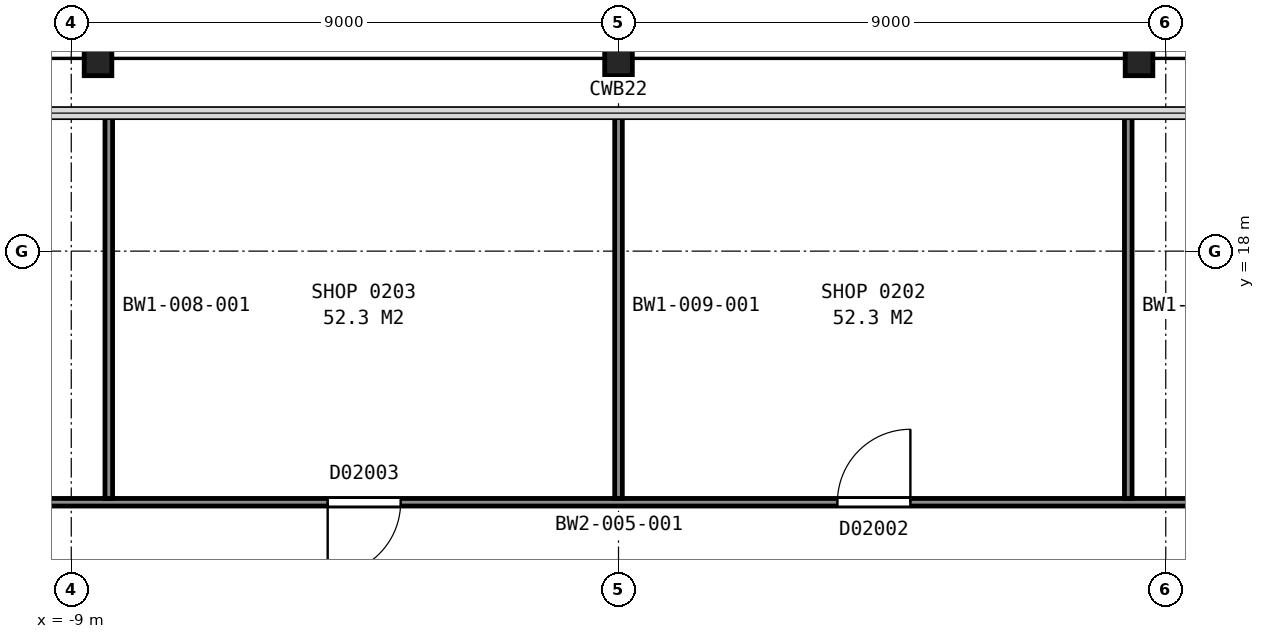
"""IFC4 building model, lengths in metres.
Left out: names, types, materials, properties, quantities, classifications, styles, units other than length and angle.
Written with IfcOpenShell. Run it as: python <this file> out.ifc"""

import sys

from ifc_helpers import new_model, si_unit, direction, frame, frame_2d, origin, origin_2d, place, context, subcontext, project, spatial, rectangle, i_section, extrude, element, fill, save


model = new_model("IFC4")
c1 = context("Model", 3, precision=1e-05, world=origin(), true_north=direction((0.0, 1.0)))
c2 = subcontext(c1, "Body", "Model", "MODEL_VIEW")
j1 = project(units=[si_unit("LENGTHUNIT", "METRE"), si_unit("PLANEANGLEUNIT", "RADIAN")], contexts=[c1])
p1 = place(None, origin())
s1 = spatial("IfcSite", under=j1, at=p1, CompositionType="ELEMENT")
p2 = place(p1, origin())
s2 = spatial("IfcBuilding", under=s1, at=p2, CompositionType="ELEMENT")
p3 = place(p2, frame((0.0, 0.0, 17.4)))
s3 = spatial("IfcBuildingStorey", under=s2, at=p3, CompositionType="ELEMENT", Elevation=17.4)
for number, where, z_axis, x_axis in (
    (1, (8.56, 21.17, -0.16), (0.0, 0.0, 1.0), (1.0, 0.0, 0.0)),
    (2, (0.0, 21.17, -0.16), (0.0, 0.0, 1.0), (1.0, 0.0, 0.0)),
    (3, (-8.56, 21.17, -0.16), (0.0, 0.0, 1.0), (1.0, 0.0, 0.0)),
):
    element("IfcColumn", number, at=place(p3, frame(where, z_axis=z_axis, x_axis=x_axis)), inside=s3, PredefinedType="COLUMN", context=c2, shape_type="SweptSolid", body=[
        extrude(i_section(OverallWidth=0.455, OverallDepth=0.569, WebThickness=0.078, FlangeThickness=0.125, FilletRadius=0.015, at=origin_2d()), origin(), (0.0, 0.0, 1.0), 5.16),
    ])
p4 = place(p3, frame((-15.148, 13.87, 0.0), z_axis=(0.0, 0.0, 1.0), x_axis=(1.0, 0.0, 0.0)))
e4 = element("IfcWall", 4, at=p4, inside=s3, PredefinedType="PARTITIONING", context=c2, shape_type="SweptSolid", body=[
    extrude(rectangle(XDim=30.297, YDim=0.125, at=frame_2d((15.148, 0.0))), origin(), (0.0, 0.0, 1.0), 3.853),
])
p5 = place(p4, frame((26.281, 0.0, 0.0)))
e5 = element("IfcOpeningElement", 5, at=p5, cuts=e4, PredefinedType="OPENING", context=c2, shape_type="SweptSolid", body=[
    extrude(rectangle(XDim=1.2, YDim=2.1, at=frame_2d((0.6, 1.05))), frame((0.0, 0.073, 0.0), z_axis=(0.0, -1.0, 0.0), x_axis=(1.0, 0.0, 0.0)), (0.0, 0.0, 1.0), 0.145),
])
p6 = place(p4, frame((18.749, 0.0, 0.0)))
e6 = element("IfcOpeningElement", 6, at=p6, cuts=e4, PredefinedType="OPENING", context=c2, shape_type="SweptSolid", body=[
    extrude(rectangle(XDim=1.2, YDim=2.1, at=frame_2d((0.6, 1.05))), frame((0.0, 0.073, 0.0), z_axis=(0.0, -1.0, 0.0), x_axis=(1.0, 0.0, 0.0)), (0.0, 0.0, 1.0), 0.145),
])
p7 = place(p4, frame((10.365, 0.0, 0.0)))
e7 = element("IfcOpeningElement", 7, at=p7, cuts=e4, PredefinedType="OPENING", context=c2, shape_type="SweptSolid", body=[
    extrude(rectangle(XDim=1.2, YDim=2.1, at=frame_2d((0.6, 1.05))), frame((0.0, 0.073, 0.0), z_axis=(0.0, -1.0, 0.0), x_axis=(1.0, 0.0, 0.0)), (0.0, 0.0, 1.0), 0.145),
])
p8 = place(p4, frame((2.812, 0.0, 0.0)))
e8 = element("IfcOpeningElement", 8, at=p8, cuts=e4, PredefinedType="OPENING", context=c2, shape_type="SweptSolid", body=[
    extrude(rectangle(XDim=1.2, YDim=2.1, at=frame_2d((0.6, 1.05))), frame((0.0, 0.073, 0.0), z_axis=(0.0, -1.0, 0.0), x_axis=(1.0, 0.0, 0.0)), (0.0, 0.0, 1.0), 0.145),
])
for number, where, z_axis, x_axis in (
    (9, (-8.383, 13.933, 0.0), (0.0, 0.0, 1.0), (0.0, 1.0, 0.0)),
    (10, (0.0, 13.933, 0.0), (0.0, 0.0, 1.0), (0.0, 1.0, 0.0)),
    (11, (8.383, 13.933, 0.0), (0.0, 0.0, 1.0), (0.0, 1.0, 0.0)),
):
    element("IfcWall", number, at=place(p3, frame(where, z_axis=z_axis, x_axis=x_axis)), inside=s3, PredefinedType="PARTITIONING", context=c2, shape_type="SweptSolid", body=[
        extrude(rectangle(XDim=6.337, YDim=0.125, at=frame_2d((3.169, 0.0))), origin(), (0.0, 0.0, 1.0), 3.853),
    ])
p9 = place(p6, origin())
e12 = element("IfcDoor", 12, at=p9, inside=s3, OperationType="SINGLE_SWING_RIGHT", PredefinedType="DOOR", context=c2, shape_type="SweptSolid", body=[
    extrude(rectangle(XDim=1.2, YDim=2.1, at=frame_2d((0.6, 1.05))), frame((0.0, 0.025, 0.0), z_axis=(0.0, -1.0, 0.0), x_axis=(1.0, 0.0, 0.0)), (0.0, 0.0, 1.0), 0.05),
])
fill(e6, e12)
p10 = place(p7, origin())
e13 = element("IfcDoor", 13, at=p10, inside=s3, OperationType="SINGLE_SWING_LEFT", PredefinedType="DOOR", context=c2, shape_type="SweptSolid", body=[
    extrude(rectangle(XDim=1.2, YDim=2.1, at=frame_2d((0.6, 1.05))), frame((0.0, 0.025, 0.0), z_axis=(0.0, -1.0, 0.0), x_axis=(1.0, 0.0, 0.0)), (0.0, 0.0, 1.0), 0.05),
])
fill(e7, e13)
save(model, sys.argv[1])
